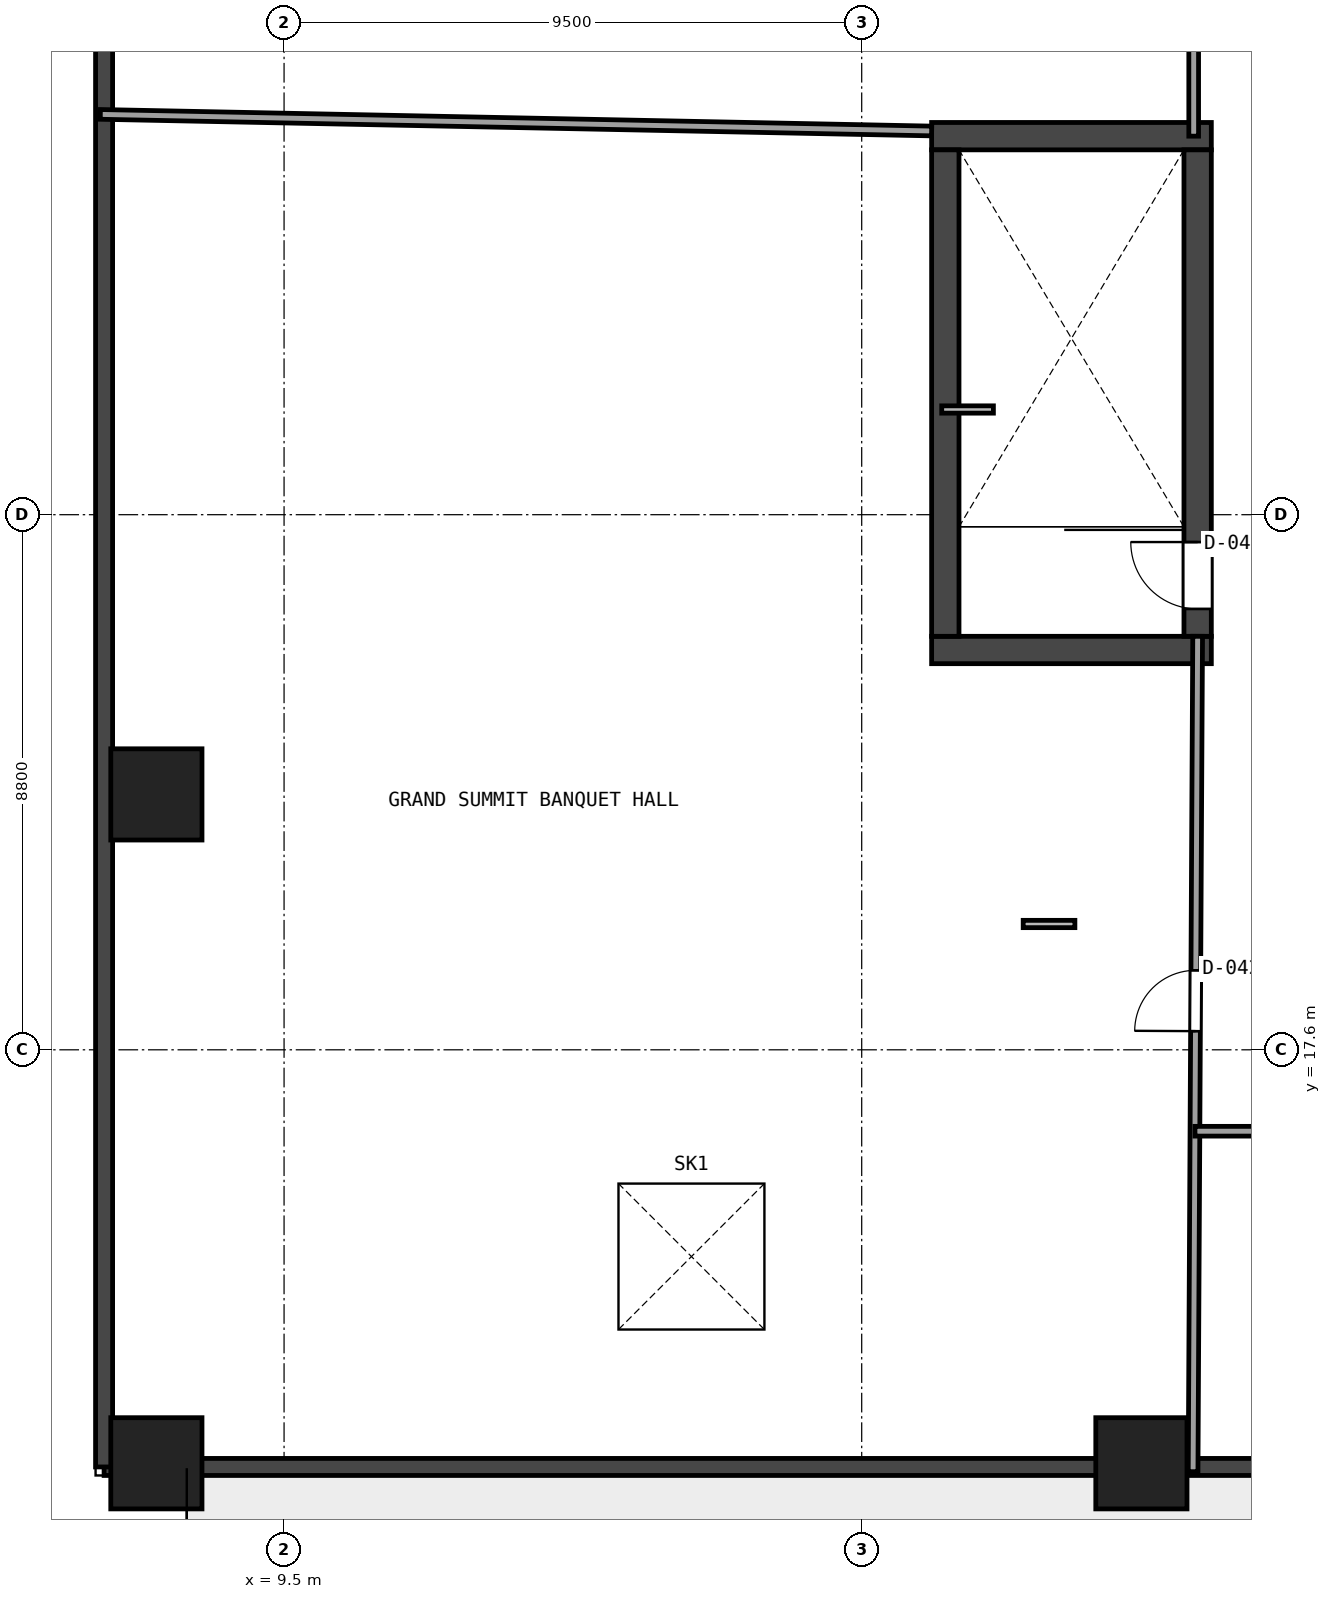
"""IFC4 building model, lengths in metres.
Left out: names, types, materials, properties, quantities, classifications, styles, units other than length and angle.
Written with IfcOpenShell. Run it as: python <this file> out.ifc"""

import sys

from ifc_helpers import new_model, si_unit, direction, frame, frame_2d, origin, origin_2d, place, context, subcontext, project, spatial, rectangle, extrude, element, fill, save


model = new_model("IFC4")
c1 = context("Model", 3, precision=1e-05, world=origin(), true_north=direction((0.0, 1.0)))
c2 = subcontext(c1, "Body", "Model", "MODEL_VIEW")
j1 = project(units=[si_unit("LENGTHUNIT", "METRE"), si_unit("PLANEANGLEUNIT", "RADIAN")], contexts=[c1])
p1 = place(None, origin())
s1 = spatial("IfcSite", under=j1, at=p1, CompositionType="ELEMENT")
p2 = place(p1, origin())
s2 = spatial("IfcBuilding", under=s1, at=p2, CompositionType="ELEMENT")
p3 = place(p2, frame((0.0, 0.0, 21.6)))
s3 = spatial("IfcBuildingStorey", under=s2, at=p3, CompositionType="ELEMENT", Elevation=21.6)
for number, where, z_axis, x_axis in (
    (1, (20.15, 24.175, 0.0), (0.0, 0.0, 1.0), (1.0, 0.0, 0.0)),
    (2, (20.15, 32.625, 0.0), (0.0, 0.0, 1.0), (1.0, 0.0, 0.0)),
):
    element("IfcWall", number, at=place(p3, frame(where, z_axis=z_axis, x_axis=x_axis)), inside=s3, PredefinedType="SHEAR", context=c2, shape_type="SweptSolid", body=[
        extrude(rectangle(XDim=4.6, YDim=0.45, at=frame_2d((2.3, 0.0))), origin(), (0.0, 0.0, 1.0), 4.98),
    ])
p4 = place(p3, frame((20.375, 24.4, 0.0), z_axis=(0.0, 0.0, 1.0), x_axis=(0.0, 1.0, 0.0)))
e3 = element("IfcWall", 3, at=p4, inside=s3, PredefinedType="SHEAR", context=c2, shape_type="SweptSolid", body=[
    extrude(rectangle(XDim=8.0, YDim=0.45, at=frame_2d((4.0, 0.0))), origin(), (0.0, 0.0, 1.0), 4.98),
])
p5 = place(p3, frame((24.525, 24.4, 0.0), z_axis=(0.0, 0.0, 1.0), x_axis=(0.0, 1.0, 0.0)))
e4 = element("IfcWall", 4, at=p5, inside=s3, PredefinedType="SHEAR", context=c2, shape_type="SweptSolid", body=[
    extrude(rectangle(XDim=8.0, YDim=0.45, at=frame_2d((4.0, 0.0))), origin(), (0.0, 0.0, 1.0), 4.98),
])
p6 = place(p5, frame((0.45, 0.0, 0.0)))
e5 = element("IfcOpeningElement", 5, at=p6, cuts=e4, PredefinedType="OPENING", context=c2, shape_type="SweptSolid", body=[
    extrude(rectangle(XDim=1.1, YDim=2.15, at=frame_2d((0.55, 1.075))), frame((0.0, 0.235, 0.0), z_axis=(0.0, -1.0, 0.0), x_axis=(1.0, 0.0, 0.0)), (0.0, 0.0, 1.0), 0.47),
])
for number, where, z_axis, x_axis in (
    (6, (7.4, 10.8, 0.0), (0.0, 0.0, 1.0), (1.0, 0.0, 0.0)),
    (7, (23.6, 10.8, 0.0), (0.0, 0.0, 1.0), (1.0, 0.0, 0.0)),
    (8, (7.4, 21.8, 0.0), (0.0, 0.0, 1.0), (1.0, 0.0, 0.0)),
):
    element("IfcColumn", number, at=place(p3, frame(where, z_axis=z_axis, x_axis=x_axis)), inside=s3, PredefinedType="COLUMN", context=c2, shape_type="SweptSolid", body=[
        extrude(rectangle(XDim=1.5, YDim=1.5, at=origin_2d()), origin(), (0.0, 0.0, 1.0), 4.98),
    ])
p7 = place(p3, frame((67.86, 10.74, 0.0), z_axis=(0.0, 0.0, 1.0), x_axis=(-1.0, 0.0, 0.0)))
e9 = element("IfcWall", 9, at=p7, inside=s3, PredefinedType="SOLIDWALL", context=c2, shape_type="SweptSolid", body=[
    extrude(rectangle(XDim=61.32, YDim=0.28, at=frame_2d((30.66, 0.0))), origin(), (0.0, 0.0, 1.0), 3.847),
])
p8 = place(p7, frame((32.26, 0.0, 0.0)))
e10 = element("IfcOpeningElement", 10, at=p8, cuts=e9, PredefinedType="OPENING", context=c2, shape_type="SweptSolid", body=[
    extrude(rectangle(XDim=1.2, YDim=2.2, at=frame_2d((0.6, 1.1))), frame((0.0, 0.15, 0.0), z_axis=(0.0, -1.0, 0.0), x_axis=(1.0, 0.0, 0.0)), (0.0, 0.0, 1.0), 0.3),
])
p9 = place(p3, frame((6.54, 10.74, 0.0), z_axis=(0.0, 0.0, 1.0), x_axis=(0.0, 1.0, 0.0)))
e11 = element("IfcWall", 11, at=p9, inside=s3, PredefinedType="SOLIDWALL", context=c2, shape_type="SweptSolid", body=[
    extrude(rectangle(XDim=38.72, YDim=0.28, at=frame_2d((19.36, 0.0))), origin(), (0.0, 0.0, 1.0), 4.98),
])
p10 = place(p3, frame((24.45, 10.662, 0.0), z_axis=(0.0, 0.0, 1.0), x_axis=(0.005455756726, 0.999985117249, 0.0)))
e12 = element("IfcWall", 12, at=p10, inside=s3, PredefinedType="PARTITIONING", context=c2, shape_type="SweptSolid", body=[
    extrude(rectangle(XDim=13.738, YDim=0.16, at=frame_2d((6.869, 0.0))), origin(), (0.0, 0.0, 1.0), 3.847),
])
p11 = place(p10, frame((7.245, 0.0, 0.0)))
e13 = element("IfcOpeningElement", 13, at=p11, cuts=e12, PredefinedType="OPENING", context=c2, shape_type="SweptSolid", body=[
    extrude(rectangle(XDim=1.0, YDim=2.15, at=frame_2d((0.5, 1.075))), frame((0.0, 0.09, 0.0), z_axis=(0.0, -1.0, 0.0), x_axis=(1.0, 0.0, 0.0)), (0.0, 0.0, 1.0), 0.18),
])
p12 = place(p3, frame((20.15, 32.71, 0.0), z_axis=(0.0, 0.0, 1.0), x_axis=(-0.999800773201, 0.019960308294, 0.0)))
e14 = element("IfcWall", 14, at=p12, inside=s3, PredefinedType="PARTITIONING", context=c2, shape_type="SweptSolid", body=[
    extrude(rectangle(XDim=13.675, YDim=0.16, at=frame_2d((6.837, 0.0))), origin(), (0.0, 0.0, 1.0), 4.121),
])
p13 = place(p3, frame((24.46, 32.625, 0.0), z_axis=(0.0, 0.0, 1.0), x_axis=(0.0, 1.0, 0.0)))
e15 = element("IfcWall", 15, at=p13, inside=s3, PredefinedType="PARTITIONING", context=c2, shape_type="SweptSolid", body=[
    extrude(rectangle(XDim=12.515, YDim=0.16, at=frame_2d((6.257, 0.0))), origin(), (0.0, 0.0, 1.0), 3.847),
])
p14 = place(p13, frame((5.758, 0.0, 0.0)))
e16 = element("IfcOpeningElement", 16, at=p14, cuts=e15, PredefinedType="OPENING", context=c2, shape_type="SweptSolid", body=[
    extrude(rectangle(XDim=1.0, YDim=2.15, at=frame_2d((0.5, 1.075))), frame((0.0, 0.09, 0.0), z_axis=(0.0, -1.0, 0.0), x_axis=(1.0, 0.0, 0.0)), (0.0, 0.0, 1.0), 0.18),
])
p15 = place(p3, frame((57.4, 16.26, 0.0), z_axis=(0.0, 0.0, 1.0), x_axis=(-0.99999999956, 2.9665668e-05, 0.0)))
e17 = element("IfcWall", 17, at=p15, inside=s3, PredefinedType="PARTITIONING", context=c2, shape_type="SweptSolid", body=[
    extrude(rectangle(XDim=32.919, YDim=0.16, at=frame_2d((16.459, 0.0))), origin(), (0.0, 0.0, 1.0), 3.847),
])
p16 = place(p15, frame((15.96, 0.0, 0.0)))
e18 = element("IfcOpeningElement", 18, at=p16, cuts=e17, PredefinedType="OPENING", context=c2, shape_type="SweptSolid", body=[
    extrude(rectangle(XDim=1.0, YDim=2.15, at=frame_2d((0.5, 1.075))), frame((0.0, 0.09, 0.0), z_axis=(0.0, -1.0, 0.0), x_axis=(1.0, 0.0, 0.0)), (0.0, 0.0, 1.0), 0.18),
])
p17 = place(p3, frame((0.0, 0.0, -0.42)))
p18 = place(p17, frame((16.2, 14.2, 0.0)))
p19 = place(p18, frame((0.0, 0.0, 0.37)))
e19 = element("IfcWindow", 19, at=p19, inside=s3, PartitioningType="SINGLE_PANEL", PredefinedType="SKYLIGHT", context=c2, shape_type="SweptSolid", body=[
    extrude(rectangle(XDim=2.4, YDim=2.4, at=origin_2d()), origin(), (0.0, 0.0, 1.0), 0.05),
])
p20 = place(p6, origin())
e20 = element("IfcDoor", 20, at=p20, inside=s3, OperationType="SINGLE_SWING_RIGHT", PredefinedType="DOOR", context=c2, shape_type="SweptSolid", body=[
    extrude(rectangle(XDim=1.1, YDim=2.15, at=frame_2d((0.55, 1.075))), frame((0.0, 0.025, 0.0), z_axis=(0.0, -1.0, 0.0), x_axis=(1.0, 0.0, 0.0)), (0.0, 0.0, 1.0), 0.05),
])
fill(e5, e20)
p21 = place(p11, origin())
e21 = element("IfcDoor", 21, at=p21, inside=s3, OperationType="SINGLE_SWING_LEFT", PredefinedType="DOOR", context=c2, shape_type="SweptSolid", body=[
    extrude(rectangle(XDim=1.0, YDim=2.15, at=frame_2d((0.5, 1.075))), frame((0.0, 0.025, 0.0), z_axis=(0.0, -1.0, 0.0), x_axis=(1.0, 0.0, 0.0)), (0.0, 0.0, 1.0), 0.05),
])
fill(e13, e21)
save(model, sys.argv[1])
